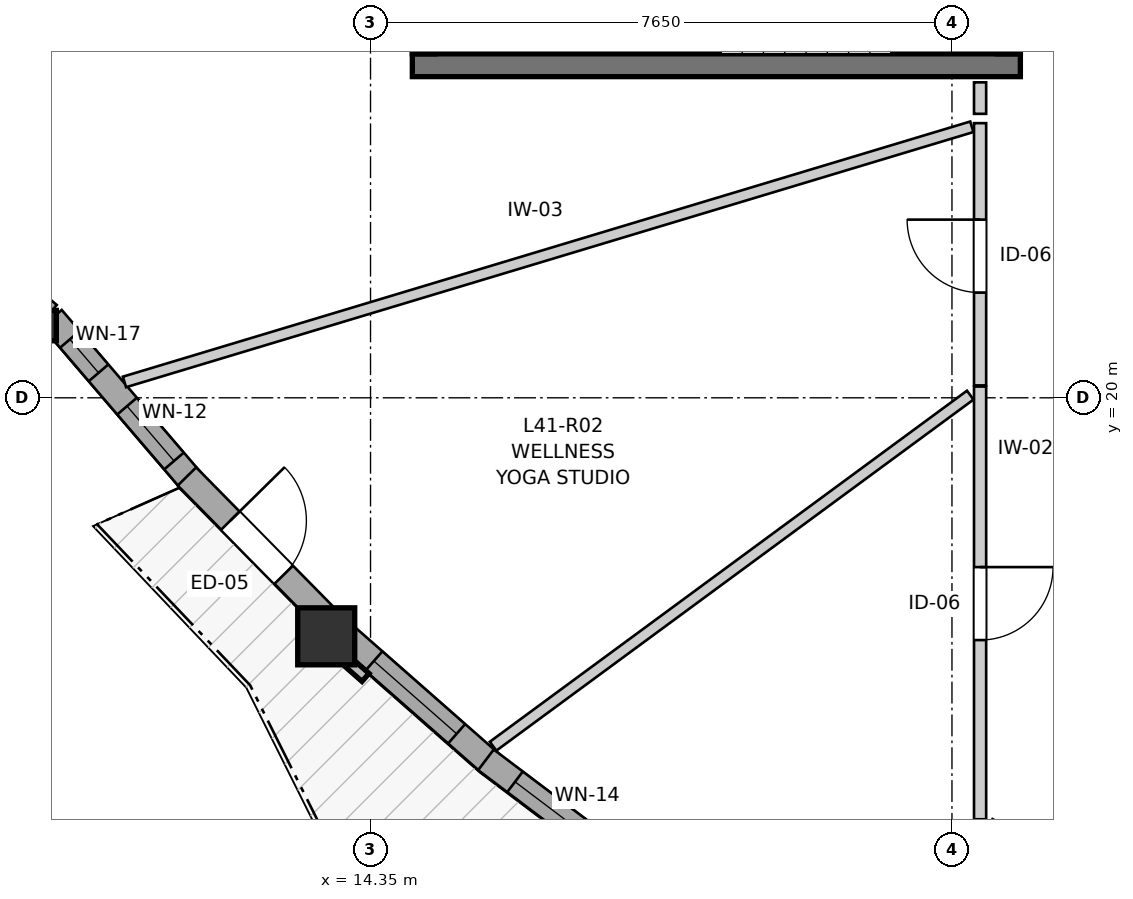
"""IFC4 building model, lengths in metres.
Left out: names, types, materials, properties, quantities, classifications, styles, units other than length and angle.
Written with IfcOpenShell. Run it as: python <this file> out.ifc"""

import sys

from ifc_helpers import new_model, si_unit, direction, frame, frame_2d, origin, origin_2d, place, context, subcontext, project, spatial, rectangle, i_section, extrude, source, transform, mapped, element, fill, save


model = new_model("IFC4")
c1 = context("Model", 3, precision=1e-05, world=origin(), true_north=direction((0.0, 1.0)))
c2 = subcontext(c1, "Body", "Model", "MODEL_VIEW")
j1 = project(units=[si_unit("LENGTHUNIT", "METRE"), si_unit("PLANEANGLEUNIT", "RADIAN")], contexts=[c1])
p1 = place(None, origin())
s1 = spatial("IfcSite", under=j1, at=p1, CompositionType="ELEMENT")
p2 = place(p1, origin())
s2 = spatial("IfcBuilding", under=s1, at=p2, CompositionType="ELEMENT")
p3 = place(p2, frame((0.0, 0.0, 139.4)))
s3 = spatial("IfcBuildingStorey", under=s2, at=p3, CompositionType="ELEMENT", Elevation=139.4)
p4 = place(p3, frame((14.9, 24.375, 0.0), z_axis=(0.0, 0.0, 1.0), x_axis=(1.0, 0.0, 0.0)))
e1 = element("IfcWall", 1, at=p4, inside=s3, PredefinedType="SHEAR", context=c2, shape_type="SweptSolid", body=[
    extrude(rectangle(XDim=8.0, YDim=0.3, at=frame_2d((4.0, 0.0))), origin(), (0.0, 0.0, 1.0), 2.95),
])
p5 = place(p3, frame((15.05, 27.475, 0.0), z_axis=(0.0, 0.0, 1.0), x_axis=(0.0, -1.0, 0.0)))
e2 = element("IfcWall", 2, at=p5, inside=s3, PredefinedType="SHEAR", context=c2, shape_type="SweptSolid", body=[
    extrude(rectangle(XDim=2.95, YDim=0.3, at=frame_2d((1.475, 0.0))), origin(), (0.0, 0.0, 1.0), 2.95),
])
p6 = place(p3, frame((22.75, 24.525, 0.0), z_axis=(0.0, 0.0, 1.0), x_axis=(0.0, 1.0, 0.0)))
e3 = element("IfcWall", 3, at=p6, inside=s3, PredefinedType="SHEAR", context=c2, shape_type="SweptSolid", body=[
    extrude(rectangle(XDim=2.95, YDim=0.3, at=frame_2d((1.475, 0.0))), origin(), (0.0, 0.0, 1.0), 2.95),
])
p7 = place(p6, frame((0.985, 0.0, 0.0)))
e4 = element("IfcOpeningElement", 4, at=p7, cuts=e3, PredefinedType="OPENING", context=c2, shape_type="SweptSolid", body=[
    extrude(rectangle(XDim=0.98, YDim=2.15, at=frame_2d((0.49, 1.075))), frame((0.0, 0.16, 0.0), z_axis=(0.0, -1.0, 0.0), x_axis=(1.0, 0.0, 0.0)), (0.0, 0.0, 1.0), 0.32),
])
m1 = source(origin(), c2, "Body", "SweptSolid", [
    extrude(i_section(OverallWidth=0.401, OverallDepth=0.399, WebThickness=0.023, FlangeThickness=0.036, FilletRadius=0.015, at=origin_2d()), origin(), (0.0, 0.0, 1.0), 2.95),
])
p8 = place(p3, frame((10.016, 20.95, 0.0), z_axis=(0.0, 0.0, 1.0), x_axis=(1.0, 0.0, 0.0)))
e5 = element("IfcColumn", 5, at=p8, inside=s3, PredefinedType="PILASTER", context=c2, shape_type="MappedRepresentation", body=[
    mapped(m1, transform((0.0, 0.0, 0.0), x_axis=(1.0, 0.0, 0.0), y_axis=(0.0, 1.0, 0.0), z_axis=(0.0, 0.0, 1.0), scale=1.0)),
])
m2 = source(origin(), c2, "Body", "SweptSolid", [
    extrude(rectangle(XDim=0.75, YDim=0.75, at=origin_2d()), origin(), (0.0, 0.0, 1.0), 2.95),
])
p9 = place(p3, frame((13.767, 16.862, 0.0), z_axis=(0.0, 0.0, 1.0), x_axis=(1.0, 0.0, 0.0)))
e6 = element("IfcColumn", 6, at=p9, inside=s3, PredefinedType="COLUMN", context=c2, shape_type="MappedRepresentation", body=[
    mapped(m2, transform((0.0, 0.0, 0.0), x_axis=(1.0, 0.0, 0.0), y_axis=(0.0, 1.0, 0.0), z_axis=(0.0, 0.0, 1.0), scale=1.0)),
])
p10 = place(p3, frame((8.573, 22.406, 0.0), z_axis=(0.0, 0.0, 1.0), x_axis=(0.760379886087, -0.649478582276, 0.0)))
e7 = element("IfcWall", 7, at=p10, inside=s3, PredefinedType="SOLIDWALL", context=c2, shape_type="SweptSolid", body=[
    extrude(rectangle(XDim=2.023, YDim=0.34, at=frame_2d((1.012, 0.0))), origin(), (0.0, 0.0, 1.0), 2.53),
])
p11 = place(p10, frame((0.322, 0.0, 0.82)))
e8 = element("IfcOpeningElement", 8, at=p11, cuts=e7, PredefinedType="OPENING", context=c2, shape_type="SweptSolid", body=[
    extrude(rectangle(XDim=1.4, YDim=1.35, at=frame_2d((0.7, 0.675))), frame((0.0, 0.18, 0.0), z_axis=(0.0, -1.0, 0.0), x_axis=(1.0, 0.0, 0.0)), (0.0, 0.0, 1.0), 0.36),
])
p12 = place(p3, frame((10.158, 21.045, 0.0), z_axis=(0.0, 0.0, 1.0), x_axis=(0.650385352329, -0.759604432238, 0.0)))
e9 = element("IfcWall", 9, at=p12, inside=s3, PredefinedType="SOLIDWALL", context=c2, shape_type="SweptSolid", body=[
    extrude(rectangle(XDim=2.823, YDim=0.34, at=frame_2d((1.412, 0.0))), origin(), (0.0, 0.0, 1.0), 2.53),
])
p13 = place(p12, frame((0.364, 0.0, 0.82)))
e10 = element("IfcOpeningElement", 10, at=p13, cuts=e9, PredefinedType="OPENING", context=c2, shape_type="SweptSolid", body=[
    extrude(rectangle(XDim=0.58, YDim=1.35, at=frame_2d((0.29, 0.675))), frame((0.0, 0.18, 0.0), z_axis=(0.0, -1.0, 0.0), x_axis=(1.0, 0.0, 0.0)), (0.0, 0.0, 1.0), 0.36),
])
p14 = place(p12, frame((1.52, 0.0, 0.82)))
e11 = element("IfcOpeningElement", 11, at=p14, cuts=e9, PredefinedType="OPENING", context=c2, shape_type="SweptSolid", body=[
    extrude(rectangle(XDim=0.95, YDim=1.35, at=frame_2d((0.475, 0.675))), frame((0.0, 0.18, 0.0), z_axis=(0.0, -1.0, 0.0), x_axis=(1.0, 0.0, 0.0)), (0.0, 0.0, 1.0), 0.36),
])
p15 = place(p3, frame((11.935, 18.965, 0.0), z_axis=(0.0, 0.0, 1.0), x_axis=(0.701560003197, -0.712610385775, 0.0)))
e12 = element("IfcWall", 12, at=p15, inside=s3, PredefinedType="SOLIDWALL", context=c2, shape_type="SweptSolid", body=[
    extrude(rectangle(XDim=2.629, YDim=0.34, at=frame_2d((1.314, 0.0))), origin(), (0.0, 0.0, 1.0), 2.53),
])
p16 = place(p15, frame((0.815, 0.0, 0.0)))
e13 = element("IfcOpeningElement", 13, at=p16, cuts=e12, PredefinedType="OPENING", context=c2, shape_type="SweptSolid", body=[
    extrude(rectangle(XDim=1.0, YDim=2.1, at=frame_2d((0.5, 1.05))), frame((0.0, 0.18, 0.0), z_axis=(0.0, -1.0, 0.0), x_axis=(1.0, 0.0, 0.0)), (0.0, 0.0, 1.0), 0.36),
])
p17 = place(p3, frame((13.996, 16.887, 0.0), z_axis=(0.0, 0.0, 1.0), x_axis=(0.75116489845, -0.660114607729, 0.0)))
e14 = element("IfcWall", 14, at=p17, inside=s3, PredefinedType="SOLIDWALL", context=c2, shape_type="SweptSolid", body=[
    extrude(rectangle(XDim=2.585, YDim=0.34, at=frame_2d((1.292, 0.0))), origin(), (0.0, 0.0, 1.0), 2.53),
])
p18 = place(p17, frame((0.531, 0.0, 0.82)))
e15 = element("IfcOpeningElement", 15, at=p18, cuts=e14, PredefinedType="OPENING", context=c2, shape_type="SweptSolid", body=[
    extrude(rectangle(XDim=1.45, YDim=1.25, at=frame_2d((0.725, 0.625))), frame((0.0, 0.18, 0.0), z_axis=(0.0, -1.0, 0.0), x_axis=(1.0, 0.0, 0.0)), (0.0, 0.0, 1.0), 0.36),
])
p19 = place(p3, frame((15.868, 15.237, 0.0), z_axis=(0.0, 0.0, 1.0), x_axis=(0.798078784288, -0.602553113069, 0.0)))
e16 = element("IfcWall", 16, at=p19, inside=s3, PredefinedType="SOLIDWALL", context=c2, shape_type="SweptSolid", body=[
    extrude(rectangle(XDim=2.689, YDim=0.34, at=frame_2d((1.345, 0.0))), origin(), (0.0, 0.0, 1.0), 2.53),
])
p20 = place(p19, frame((0.48, 0.0, 0.82)))
e17 = element("IfcOpeningElement", 17, at=p20, cuts=e16, PredefinedType="OPENING", context=c2, shape_type="SweptSolid", body=[
    extrude(rectangle(XDim=1.75, YDim=1.3, at=frame_2d((0.875, 0.65))), frame((0.0, 0.18, 0.0), z_axis=(0.0, -1.0, 0.0), x_axis=(1.0, 0.0, 0.0)), (0.0, 0.0, 1.0), 0.36),
])
p21 = place(p3, frame((22.37, 20.148, 0.0), z_axis=(0.0, 0.0, 1.0), x_axis=(0.0, -1.0, 0.0)))
e18 = element("IfcWall", 18, at=p21, inside=s3, PredefinedType="PARTITIONING", context=c2, shape_type="SweptSolid", body=[
    extrude(rectangle(XDim=5.693, YDim=0.16, at=frame_2d((2.846, 0.0))), origin(), (0.0, 0.0, 1.0), 2.95),
])
p22 = place(p21, frame((2.375, 0.0, 0.0)))
e19 = element("IfcOpeningElement", 19, at=p22, cuts=e18, PredefinedType="OPENING", context=c2, shape_type="SweptSolid", body=[
    extrude(rectangle(XDim=0.96, YDim=2.1, at=frame_2d((0.48, 1.05))), frame((0.0, 0.09, 0.0), z_axis=(0.0, -1.0, 0.0), x_axis=(1.0, 0.0, 0.0)), (0.0, 0.0, 1.0), 0.18),
])
p23 = place(p3, frame((22.37, 20.163, 0.0), z_axis=(0.0, 0.0, 1.0), x_axis=(0.0, 1.0, 0.0)))
e20 = element("IfcWall", 20, at=p23, inside=s3, PredefinedType="PARTITIONING", context=c2, shape_type="SweptSolid", body=[
    extrude(rectangle(XDim=3.45, YDim=0.16, at=frame_2d((1.725, 0.0))), origin(), (0.0, 0.0, 1.0), 2.95),
])
p24 = place(p23, frame((1.221, 0.0, 0.0)))
e21 = element("IfcOpeningElement", 21, at=p24, cuts=e20, PredefinedType="OPENING", context=c2, shape_type="SweptSolid", body=[
    extrude(rectangle(XDim=0.96, YDim=2.1, at=frame_2d((0.48, 1.05))), frame((0.0, 0.09, 0.0), z_axis=(0.0, -1.0, 0.0), x_axis=(1.0, 0.0, 0.0)), (0.0, 0.0, 1.0), 0.18),
])
p25 = place(p3, frame((11.113, 20.208, 0.0), z_axis=(0.0, 0.0, 1.0), x_axis=(0.957541878855, 0.288294207778, 0.0)))
e22 = element("IfcWall", 22, at=p25, inside=s3, PredefinedType="PARTITIONING", context=c2, shape_type="SweptSolid", body=[
    extrude(rectangle(XDim=11.643, YDim=0.145, at=frame_2d((5.822, 0.0))), origin(), (0.0, 0.0, 1.0), 2.95),
])
p26 = place(p3, frame((15.962, 15.416, 0.0), z_axis=(0.0, 0.0, 1.0), x_axis=(0.805487856374, 0.59261227901, 0.0)))
e23 = element("IfcWall", 23, at=p26, inside=s3, PredefinedType="PARTITIONING", context=c2, shape_type="SweptSolid", body=[
    extrude(rectangle(XDim=7.794, YDim=0.145, at=frame_2d((3.897, 0.0))), origin(), (0.0, 0.0, 1.0), 2.95),
])
p27 = place(p3, frame((22.495, 14.387, 0.0), z_axis=(0.0, 0.0, 1.0), x_axis=(0.879618674253, -0.475679501245, 0.0)))
e24 = element("IfcWall", 24, at=p27, inside=s3, PredefinedType="PARTITIONING", context=c2, shape_type="SweptSolid", body=[
    extrude(rectangle(XDim=1.603, YDim=0.16, at=frame_2d((0.801, 0.0))), origin(), (0.0, 0.0, 1.0), 2.95),
])
p28 = place(p3, frame((22.37, 23.736, 0.0), z_axis=(0.0, 0.0, 1.0), x_axis=(0.0, 1.0, 0.0)))
e25 = element("IfcWall", 25, at=p28, inside=s3, PredefinedType="PARTITIONING", context=c2, shape_type="SweptSolid", body=[
    extrude(rectangle(XDim=0.414, YDim=0.16, at=frame_2d((0.207, 0.0))), origin(), (0.0, 0.0, 1.0), 2.95),
])
m3 = source(origin(), c2, "Body", "SweptSolid", [
    extrude(rectangle(XDim=0.58, YDim=1.35, at=frame_2d((0.29, 0.675))), frame((0.0, 0.03, 0.0), z_axis=(0.0, -1.0, 0.0), x_axis=(1.0, 0.0, 0.0)), (0.0, 0.0, 1.0), 0.06),
])
p29 = place(p13, origin())
e26 = element("IfcWindow", 26, at=p29, inside=s3, PartitioningType="SINGLE_PANEL", PredefinedType="WINDOW", context=c2, shape_type="MappedRepresentation", body=[
    mapped(m3, transform((0.0, 0.0, 0.0), x_axis=(1.0, 0.0, 0.0), y_axis=(0.0, 1.0, 0.0), z_axis=(0.0, 0.0, 1.0), scale=1.0)),
])
fill(e10, e26)
m4 = source(origin(), c2, "Body", "SweptSolid", [
    extrude(rectangle(XDim=0.95, YDim=1.35, at=frame_2d((0.475, 0.675))), frame((0.0, 0.03, 0.0), z_axis=(0.0, -1.0, 0.0), x_axis=(1.0, 0.0, 0.0)), (0.0, 0.0, 1.0), 0.06),
])
p30 = place(p14, origin())
e27 = element("IfcWindow", 27, at=p30, inside=s3, PartitioningType="SINGLE_PANEL", PredefinedType="WINDOW", context=c2, shape_type="MappedRepresentation", body=[
    mapped(m4, transform((0.0, 0.0, 0.0), x_axis=(1.0, 0.0, 0.0), y_axis=(0.0, 1.0, 0.0), z_axis=(0.0, 0.0, 1.0), scale=1.0)),
])
fill(e11, e27)
m5 = source(origin(), c2, "Body", "SweptSolid", [
    extrude(rectangle(XDim=1.45, YDim=1.25, at=frame_2d((0.725, 0.625))), frame((0.0, 0.03, 0.0), z_axis=(0.0, -1.0, 0.0), x_axis=(1.0, 0.0, 0.0)), (0.0, 0.0, 1.0), 0.06),
])
p31 = place(p18, origin())
e28 = element("IfcWindow", 28, at=p31, inside=s3, PartitioningType="SINGLE_PANEL", PredefinedType="WINDOW", context=c2, shape_type="MappedRepresentation", body=[
    mapped(m5, transform((0.0, 0.0, 0.0), x_axis=(1.0, 0.0, 0.0), y_axis=(0.0, 1.0, 0.0), z_axis=(0.0, 0.0, 1.0), scale=1.0)),
])
fill(e15, e28)
m6 = source(origin(), c2, "Body", "SweptSolid", [
    extrude(rectangle(XDim=1.75, YDim=1.3, at=frame_2d((0.875, 0.65))), frame((0.0, 0.03, 0.0), z_axis=(0.0, -1.0, 0.0), x_axis=(1.0, 0.0, 0.0)), (0.0, 0.0, 1.0), 0.06),
])
p32 = place(p20, origin())
e29 = element("IfcWindow", 29, at=p32, inside=s3, PartitioningType="SINGLE_PANEL", PredefinedType="WINDOW", context=c2, shape_type="MappedRepresentation", body=[
    mapped(m6, transform((0.0, 0.0, 0.0), x_axis=(1.0, 0.0, 0.0), y_axis=(0.0, 1.0, 0.0), z_axis=(0.0, 0.0, 1.0), scale=1.0)),
])
fill(e17, e29)
m7 = source(origin(), c2, "Body", "SweptSolid", [
    extrude(rectangle(XDim=1.0, YDim=2.1, at=frame_2d((0.5, 1.05))), frame((0.0, 0.025, 0.0), z_axis=(0.0, -1.0, 0.0), x_axis=(1.0, 0.0, 0.0)), (0.0, 0.0, 1.0), 0.05),
])
p33 = place(p16, origin())
e30 = element("IfcDoor", 30, at=p33, inside=s3, OperationType="SINGLE_SWING_LEFT", PredefinedType="DOOR", context=c2, shape_type="MappedRepresentation", body=[
    mapped(m7, transform((0.0, 0.0, 0.0), x_axis=(1.0, 0.0, 0.0), y_axis=(0.0, 1.0, 0.0), z_axis=(0.0, 0.0, 1.0), scale=1.0)),
])
fill(e13, e30)
m8 = source(origin(), c2, "Body", "SweptSolid", [
    extrude(rectangle(XDim=0.96, YDim=2.1, at=frame_2d((0.48, 1.05))), frame((0.0, 0.025, 0.0), z_axis=(0.0, -1.0, 0.0), x_axis=(1.0, 0.0, 0.0)), (0.0, 0.0, 1.0), 0.05),
])
p34 = place(p22, origin())
e31 = element("IfcDoor", 31, at=p34, inside=s3, OperationType="SINGLE_SWING_LEFT", PredefinedType="DOOR", context=c2, shape_type="MappedRepresentation", body=[
    mapped(m8, transform((0.0, 0.0, 0.0), x_axis=(1.0, 0.0, 0.0), y_axis=(0.0, 1.0, 0.0), z_axis=(0.0, 0.0, 1.0), scale=1.0)),
])
fill(e19, e31)
p35 = place(p24, origin())
e32 = element("IfcDoor", 32, at=p35, inside=s3, OperationType="SINGLE_SWING_RIGHT", PredefinedType="DOOR", context=c2, shape_type="MappedRepresentation", body=[
    mapped(m8, transform((0.0, 0.0, 0.0), x_axis=(1.0, 0.0, 0.0), y_axis=(0.0, 1.0, 0.0), z_axis=(0.0, 0.0, 1.0), scale=1.0)),
])
fill(e21, e32)
save(model, sys.argv[1])
